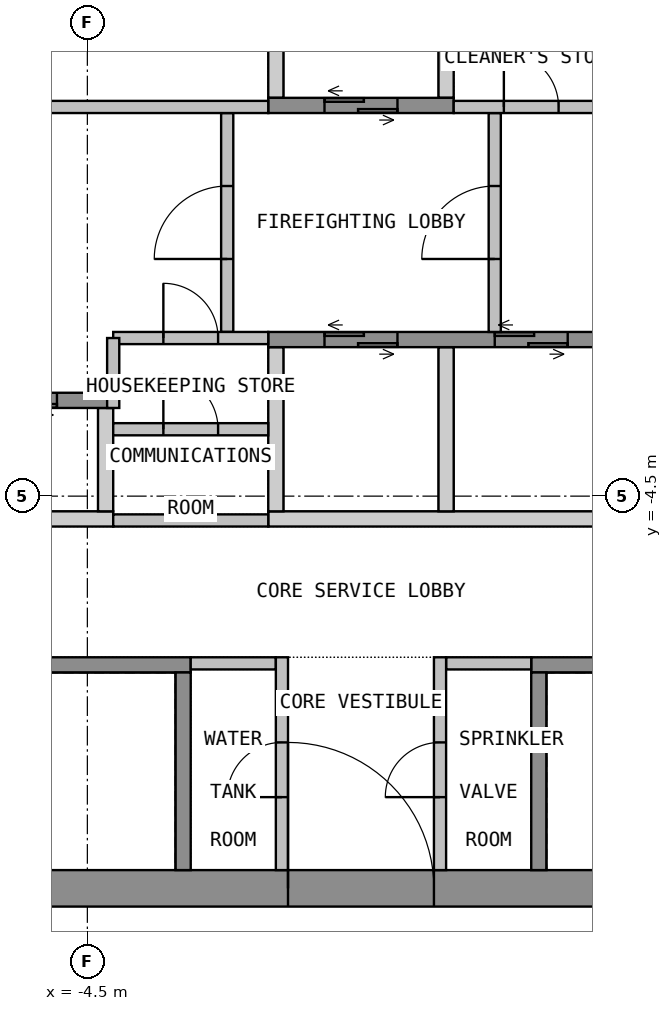
"""IFC4 building model, lengths in metres.
Left out: names, types, materials, properties, quantities, classifications, styles, units other than length and angle.
Written with IfcOpenShell. Run it as: python <this file> out.ifc"""

import sys

from ifc_helpers import new_model, si_unit, direction, frame, frame_2d, origin, place, context, subcontext, project, spatial, polyline, rectangle, outline, extrude, element, fill, save


model = new_model("IFC4")
c1 = context("Model", 3, precision=1e-05, world=origin(), true_north=direction((0.0, 1.0)))
c2 = subcontext(c1, "Body", "Model", "MODEL_VIEW")
j1 = project(units=[si_unit("LENGTHUNIT", "METRE"), si_unit("PLANEANGLEUNIT", "RADIAN")], contexts=[c1])
p1 = place(None, origin())
s1 = spatial("IfcSite", under=j1, at=p1, CompositionType="ELEMENT")
p2 = place(p1, origin())
s2 = spatial("IfcBuilding", under=s1, at=p2, CompositionType="ELEMENT")
p3 = place(p2, frame((0.0, 0.0, 179.4)))
s3 = spatial("IfcBuildingStorey", under=s2, at=p3, CompositionType="ELEMENT", Elevation=179.4)
p4 = place(p3, frame((-13.5, -10.95, 0.0), z_axis=(0.0, 0.0, 1.0), x_axis=(1.0, 0.0, 0.0)))
e1 = element("IfcWall", 1, at=p4, inside=s3, PredefinedType="SHEAR", context=c2, shape_type="SweptSolid", body=[
    extrude(rectangle(XDim=27.0, YDim=0.6, at=frame_2d((13.5, 0.0))), origin(), (0.0, 0.0, 1.0), 4.15),
])
p5 = place(p4, frame((12.3, 0.0, 0.0)))
e2 = element("IfcOpeningElement", 2, at=p5, cuts=e1, PredefinedType="OPENING", context=c2, shape_type="SweptSolid", body=[
    extrude(rectangle(XDim=2.4, YDim=2.1, at=frame_2d((1.2, 1.05))), frame((0.0, 0.31, 0.0), z_axis=(0.0, -1.0, 0.0), x_axis=(1.0, 0.0, 0.0)), (0.0, 0.0, 1.0), 0.62),
])
p6 = place(p4, frame((1.05, 0.0, 0.0)))
e3 = element("IfcOpeningElement", 3, at=p6, cuts=e1, PredefinedType="OPENING", context=c2, shape_type="SweptSolid", body=[
    extrude(rectangle(XDim=1.2, YDim=2.1, at=frame_2d((0.6, 1.05))), frame((0.0, 0.31, 0.0), z_axis=(0.0, -1.0, 0.0), x_axis=(1.0, 0.0, 0.0)), (0.0, 0.0, 1.0), 0.62),
])
p7 = place(p4, frame((24.75, 0.0, 0.0)))
e4 = element("IfcOpeningElement", 4, at=p7, cuts=e1, PredefinedType="OPENING", context=c2, shape_type="SweptSolid", body=[
    extrude(rectangle(XDim=1.2, YDim=2.1, at=frame_2d((0.6, 1.05))), frame((0.0, 0.31, 0.0), z_axis=(0.0, -1.0, 0.0), x_axis=(1.0, 0.0, 0.0)), (0.0, 0.0, 1.0), 0.62),
])
p8 = place(p3, origin())
e5 = element("IfcWall", 5, at=p8, inside=s3, PredefinedType="SHEAR", context=c2, shape_type="SweptSolid", body=[
    extrude(outline(polyline([(-1.525, 2.05), (-1.275, 2.05), (-1.275, 4.75), (-1.525, 4.75), (-1.525, 2.05)])), origin(), (0.0, 0.0, 1.0), 4.15),
])
p9 = place(p3, origin())
e6 = element("IfcWall", 6, at=p9, inside=s3, PredefinedType="SHEAR", context=c2, shape_type="SweptSolid", body=[
    extrude(outline(polyline([(1.275, 2.05), (1.525, 2.05), (1.525, 4.75), (1.275, 4.75), (1.275, 2.05)])), origin(), (0.0, 0.0, 1.0), 4.15),
])
p10 = place(p3, frame((-1.525, 1.925, 0.0), z_axis=(0.0, 0.0, 1.0), x_axis=(1.0, 0.0, 0.0)))
e7 = element("IfcWall", 7, at=p10, inside=s3, PredefinedType="SHEAR", context=c2, shape_type="SweptSolid", body=[
    extrude(rectangle(XDim=3.05, YDim=0.25, at=frame_2d((1.525, 0.0))), origin(), (0.0, 0.0, 1.0), 4.15),
])
p11 = place(p10, frame((0.925, 0.0, 0.0)))
e8 = element("IfcOpeningElement", 8, at=p11, cuts=e7, PredefinedType="OPENING", context=c2, shape_type="SweptSolid", body=[
    extrude(rectangle(XDim=1.2, YDim=2.1, at=frame_2d((0.6, 1.05))), frame((0.0, 0.135, 0.0), z_axis=(0.0, -1.0, 0.0), x_axis=(1.0, 0.0, 0.0)), (0.0, 0.0, 1.0), 0.27),
])
p12 = place(p3, origin())
e9 = element("IfcWall", 9, at=p12, inside=s3, PredefinedType="SHEAR", context=c2, shape_type="SweptSolid", body=[
    extrude(outline(polyline([(-12.9, -5.0), (-4.075, -5.0), (-4.075, -4.75), (-12.9, -4.75), (-12.9, -5.0)])), origin(), (0.0, 0.0, 1.0), 4.15),
])
p13 = place(p3, origin())
e10 = element("IfcWall", 10, at=p13, inside=s3, PredefinedType="SHEAR", context=c2, shape_type="SweptSolid", body=[
    extrude(outline(polyline([(-1.525, -5.0), (12.9, -5.0), (12.9, -4.75), (-1.525, -4.75), (-1.525, -5.0)])), origin(), (0.0, 0.0, 1.0), 4.15),
])
p14 = place(p3, origin())
e11 = element("IfcWall", 11, at=p14, inside=s3, PredefinedType="SHEAR", context=c2, shape_type="SweptSolid", body=[
    extrude(outline(polyline([(-4.325, -4.75), (-4.075, -4.75), (-4.075, -3.05), (-4.325, -3.05), (-4.325, -4.75)])), origin(), (0.0, 0.0, 1.0), 4.15),
])
p15 = place(p3, origin())
e12 = element("IfcWall", 12, at=p15, inside=s3, PredefinedType="SHEAR", context=c2, shape_type="SweptSolid", body=[
    extrude(outline(polyline([(-1.525, -4.75), (-1.275, -4.75), (-1.275, -2.05), (-1.525, -2.05), (-1.525, -4.75)])), origin(), (0.0, 0.0, 1.0), 4.15),
])
p16 = place(p3, origin())
e13 = element("IfcWall", 13, at=p16, inside=s3, PredefinedType="SHEAR", context=c2, shape_type="SweptSolid", body=[
    extrude(outline(polyline([(1.275, -4.75), (1.525, -4.75), (1.525, -2.05), (1.275, -2.05), (1.275, -4.75)])), origin(), (0.0, 0.0, 1.0), 4.15),
])
p17 = place(p3, frame((-12.9, -2.925, 0.0), z_axis=(0.0, 0.0, 1.0), x_axis=(1.0, 0.0, 0.0)))
e14 = element("IfcWall", 14, at=p17, inside=s3, PredefinedType="SHEAR", context=c2, shape_type="SweptSolid", body=[
    extrude(rectangle(XDim=8.825, YDim=0.25, at=frame_2d((4.413, 0.0))), origin(), (0.0, 0.0, 1.0), 4.15),
])
p18 = place(p17, frame((1.1, 0.0, 0.0)))
e15 = element("IfcOpeningElement", 15, at=p18, cuts=e14, PredefinedType="OPENING", context=c2, shape_type="SweptSolid", body=[
    extrude(rectangle(XDim=1.2, YDim=2.1, at=frame_2d((0.6, 1.05))), frame((0.0, 0.135, 0.0), z_axis=(0.0, -1.0, 0.0), x_axis=(1.0, 0.0, 0.0)), (0.0, 0.0, 1.0), 0.27),
])
p19 = place(p17, frame((3.9, 0.0, 0.0)))
e16 = element("IfcOpeningElement", 16, at=p19, cuts=e14, PredefinedType="OPENING", context=c2, shape_type="SweptSolid", body=[
    extrude(rectangle(XDim=1.2, YDim=2.1, at=frame_2d((0.6, 1.05))), frame((0.0, 0.135, 0.0), z_axis=(0.0, -1.0, 0.0), x_axis=(1.0, 0.0, 0.0)), (0.0, 0.0, 1.0), 0.27),
])
p20 = place(p17, frame((6.7, 0.0, 0.0)))
e17 = element("IfcOpeningElement", 17, at=p20, cuts=e14, PredefinedType="OPENING", context=c2, shape_type="SweptSolid", body=[
    extrude(rectangle(XDim=1.2, YDim=2.1, at=frame_2d((0.6, 1.05))), frame((0.0, 0.135, 0.0), z_axis=(0.0, -1.0, 0.0), x_axis=(1.0, 0.0, 0.0)), (0.0, 0.0, 1.0), 0.27),
])
p21 = place(p3, frame((-1.525, -1.925, 0.0), z_axis=(0.0, 0.0, 1.0), x_axis=(1.0, 0.0, 0.0)))
e18 = element("IfcWall", 18, at=p21, inside=s3, PredefinedType="SHEAR", context=c2, shape_type="SweptSolid", body=[
    extrude(rectangle(XDim=14.425, YDim=0.25, at=frame_2d((7.212, 0.0))), origin(), (0.0, 0.0, 1.0), 4.15),
])
p22 = place(p21, frame((0.925, 0.0, 0.0)))
e19 = element("IfcOpeningElement", 19, at=p22, cuts=e18, PredefinedType="OPENING", context=c2, shape_type="SweptSolid", body=[
    extrude(rectangle(XDim=1.2, YDim=2.1, at=frame_2d((0.6, 1.05))), frame((0.0, 0.135, 0.0), z_axis=(0.0, -1.0, 0.0), x_axis=(1.0, 0.0, 0.0)), (0.0, 0.0, 1.0), 0.27),
])
p23 = place(p21, frame((3.725, 0.0, 0.0)))
e20 = element("IfcOpeningElement", 20, at=p23, cuts=e18, PredefinedType="OPENING", context=c2, shape_type="SweptSolid", body=[
    extrude(rectangle(XDim=1.2, YDim=2.1, at=frame_2d((0.6, 1.05))), frame((0.0, 0.135, 0.0), z_axis=(0.0, -1.0, 0.0), x_axis=(1.0, 0.0, 0.0)), (0.0, 0.0, 1.0), 0.27),
])
p24 = place(p3, frame((-2.2, -1.8, 0.0), z_axis=(0.0, 0.0, 1.0), x_axis=(0.0, 1.0, 0.0)))
e21 = element("IfcWall", 21, at=p24, inside=s3, PredefinedType="PARTITIONING", context=c2, shape_type="SweptSolid", body=[
    extrude(rectangle(XDim=3.6, YDim=0.2, at=frame_2d((1.8, 0.0))), origin(), (0.0, 0.0, 1.0), 4.15),
])
p25 = place(p24, frame((1.2, 0.0, 0.0)))
e22 = element("IfcOpeningElement", 22, at=p25, cuts=e21, PredefinedType="OPENING", context=c2, shape_type="SweptSolid", body=[
    extrude(rectangle(XDim=1.2, YDim=2.1, at=frame_2d((0.6, 1.05))), frame((0.0, 0.11, 0.0), z_axis=(0.0, -1.0, 0.0), x_axis=(1.0, 0.0, 0.0)), (0.0, 0.0, 1.0), 0.22),
])
p26 = place(p3, frame((2.2, -1.8, 0.0), z_axis=(0.0, 0.0, 1.0), x_axis=(0.0, 1.0, 0.0)))
e23 = element("IfcWall", 23, at=p26, inside=s3, PredefinedType="PARTITIONING", context=c2, shape_type="SweptSolid", body=[
    extrude(rectangle(XDim=3.6, YDim=0.2, at=frame_2d((1.8, 0.0))), origin(), (0.0, 0.0, 1.0), 4.15),
])
p27 = place(p26, frame((1.2, 0.0, 0.0)))
e24 = element("IfcOpeningElement", 24, at=p27, cuts=e23, PredefinedType="OPENING", context=c2, shape_type="SweptSolid", body=[
    extrude(rectangle(XDim=1.2, YDim=2.1, at=frame_2d((0.6, 1.05))), frame((0.0, 0.11, 0.0), z_axis=(0.0, -1.0, 0.0), x_axis=(1.0, 0.0, 0.0)), (0.0, 0.0, 1.0), 0.22),
])
p28 = place(p3, frame((-12.9, -7.275, 0.0), z_axis=(0.0, 0.0, 1.0), x_axis=(1.0, 0.0, 0.0)))
e25 = element("IfcWall", 25, at=p28, inside=s3, PredefinedType="SHEAR", context=c2, shape_type="SweptSolid", body=[
    extrude(rectangle(XDim=10.1, YDim=0.25, at=frame_2d((5.05, 0.0))), origin(), (0.0, 0.0, 1.0), 4.15),
])
p29 = place(p28, frame((0.45, 0.0, 0.0)))
e26 = element("IfcOpeningElement", 26, at=p29, cuts=e25, PredefinedType="OPENING", context=c2, shape_type="SweptSolid", body=[
    extrude(rectangle(XDim=1.2, YDim=2.1, at=frame_2d((0.6, 1.05))), frame((0.0, 0.135, 0.0), z_axis=(0.0, -1.0, 0.0), x_axis=(1.0, 0.0, 0.0)), (0.0, 0.0, 1.0), 0.27),
])
p30 = place(p3, frame((-2.925, -10.65, 0.0), z_axis=(0.0, 0.0, 1.0), x_axis=(0.0, 1.0, 0.0)))
e27 = element("IfcWall", 27, at=p30, inside=s3, PredefinedType="SHEAR", context=c2, shape_type="SweptSolid", body=[
    extrude(rectangle(XDim=3.25, YDim=0.25, at=frame_2d((1.625, 0.0))), origin(), (0.0, 0.0, 1.0), 4.15),
])
p31 = place(p3, frame((2.8, -7.275, 0.0), z_axis=(0.0, 0.0, 1.0), x_axis=(1.0, 0.0, 0.0)))
e28 = element("IfcWall", 28, at=p31, inside=s3, PredefinedType="SHEAR", context=c2, shape_type="SweptSolid", body=[
    extrude(rectangle(XDim=10.1, YDim=0.25, at=frame_2d((5.05, 0.0))), origin(), (0.0, 0.0, 1.0), 4.15),
])
p32 = place(p31, frame((8.45, 0.0, 0.0)))
e29 = element("IfcOpeningElement", 29, at=p32, cuts=e28, PredefinedType="OPENING", context=c2, shape_type="SweptSolid", body=[
    extrude(rectangle(XDim=1.2, YDim=2.1, at=frame_2d((0.6, 1.05))), frame((0.0, 0.135, 0.0), z_axis=(0.0, -1.0, 0.0), x_axis=(1.0, 0.0, 0.0)), (0.0, 0.0, 1.0), 0.27),
])
p33 = place(p3, frame((2.925, -10.65, 0.0), z_axis=(0.0, 0.0, 1.0), x_axis=(0.0, 1.0, 0.0)))
e30 = element("IfcWall", 30, at=p33, inside=s3, PredefinedType="SHEAR", context=c2, shape_type="SweptSolid", body=[
    extrude(rectangle(XDim=3.25, YDim=0.25, at=frame_2d((1.625, 0.0))), origin(), (0.0, 0.0, 1.0), 4.15),
])
for number, where, z_axis, x_axis in (
    (31, (-2.8, -7.25, 0.0), (0.0, 0.0, 1.0), (1.0, 0.0, 0.0)),
    (32, (1.4, -7.25, 0.0), (0.0, 0.0, 1.0), (1.0, 0.0, 0.0)),
):
    element("IfcWall", number, at=place(p3, frame(where, z_axis=z_axis, x_axis=x_axis)), inside=s3, PredefinedType="PARTITIONING", context=c2, shape_type="SweptSolid", body=[
        extrude(rectangle(XDim=1.4, YDim=0.2, at=frame_2d((0.7, 0.0))), origin(), (0.0, 0.0, 1.0), 4.15),
    ])
p34 = place(p3, frame((-1.3, -10.65, 0.0), z_axis=(0.0, 0.0, 1.0), x_axis=(0.0, 1.0, 0.0)))
e33 = element("IfcWall", 33, at=p34, inside=s3, PredefinedType="PARTITIONING", context=c2, shape_type="SweptSolid", body=[
    extrude(rectangle(XDim=3.5, YDim=0.2, at=frame_2d((1.75, 0.0))), origin(), (0.0, 0.0, 1.0), 4.15),
])
p35 = place(p34, frame((1.2, 0.0, 0.0)))
e34 = element("IfcOpeningElement", 34, at=p35, cuts=e33, PredefinedType="OPENING", context=c2, shape_type="SweptSolid", body=[
    extrude(rectangle(XDim=0.9, YDim=2.1, at=frame_2d((0.45, 1.05))), frame((0.0, 0.11, 0.0), z_axis=(0.0, -1.0, 0.0), x_axis=(1.0, 0.0, 0.0)), (0.0, 0.0, 1.0), 0.22),
])
p36 = place(p3, frame((1.3, -10.65, 0.0), z_axis=(0.0, 0.0, 1.0), x_axis=(0.0, 1.0, 0.0)))
e35 = element("IfcWall", 35, at=p36, inside=s3, PredefinedType="PARTITIONING", context=c2, shape_type="SweptSolid", body=[
    extrude(rectangle(XDim=3.5, YDim=0.2, at=frame_2d((1.75, 0.0))), origin(), (0.0, 0.0, 1.0), 4.15),
])
p37 = place(p36, frame((1.2, 0.0, 0.0)))
e36 = element("IfcOpeningElement", 36, at=p37, cuts=e35, PredefinedType="OPENING", context=c2, shape_type="SweptSolid", body=[
    extrude(rectangle(XDim=0.9, YDim=2.1, at=frame_2d((0.45, 1.05))), frame((0.0, 0.11, 0.0), z_axis=(0.0, -1.0, 0.0), x_axis=(1.0, 0.0, 0.0)), (0.0, 0.0, 1.0), 0.22),
])
p38 = place(p3, frame((-12.9, 1.9, 0.0), z_axis=(0.0, 0.0, 1.0), x_axis=(1.0, 0.0, 0.0)))
e37 = element("IfcWall", 37, at=p38, inside=s3, PredefinedType="PARTITIONING", context=c2, shape_type="SweptSolid", body=[
    extrude(rectangle(XDim=11.375, YDim=0.2, at=frame_2d((5.688, 0.0))), origin(), (0.0, 0.0, 1.0), 4.15),
])
p39 = place(p38, frame((5.087, 0.0, 0.0)))
e38 = element("IfcOpeningElement", 38, at=p39, cuts=e37, PredefinedType="OPENING", context=c2, shape_type="SweptSolid", body=[
    extrude(rectangle(XDim=1.2, YDim=2.1, at=frame_2d((0.6, 1.05))), frame((0.0, 0.11, 0.0), z_axis=(0.0, -1.0, 0.0), x_axis=(1.0, 0.0, 0.0)), (0.0, 0.0, 1.0), 0.22),
])
p40 = place(p3, frame((1.525, 1.9, 0.0), z_axis=(0.0, 0.0, 1.0), x_axis=(1.0, 0.0, 0.0)))
e39 = element("IfcWall", 39, at=p40, inside=s3, PredefinedType="PARTITIONING", context=c2, shape_type="SweptSolid", body=[
    extrude(rectangle(XDim=2.55, YDim=0.2, at=frame_2d((1.275, 0.0))), origin(), (0.0, 0.0, 1.0), 4.15),
])
p41 = place(p40, frame((0.825, 0.0, 0.0)))
e40 = element("IfcOpeningElement", 40, at=p41, cuts=e39, PredefinedType="OPENING", context=c2, shape_type="SweptSolid", body=[
    extrude(rectangle(XDim=0.9, YDim=2.1, at=frame_2d((0.45, 1.05))), frame((0.0, 0.11, 0.0), z_axis=(0.0, -1.0, 0.0), x_axis=(1.0, 0.0, 0.0)), (0.0, 0.0, 1.0), 0.22),
])
p42 = place(p3, frame((-4.075, -3.4, 0.0), z_axis=(0.0, 0.0, 1.0), x_axis=(1.0, 0.0, 0.0)))
e41 = element("IfcWall", 41, at=p42, inside=s3, PredefinedType="PARTITIONING", context=c2, shape_type="SweptSolid", body=[
    extrude(rectangle(XDim=2.55, YDim=0.2, at=frame_2d((1.275, 0.0))), origin(), (0.0, 0.0, 1.0), 4.15),
])
p43 = place(p42, frame((0.825, 0.0, 0.0)))
e42 = element("IfcOpeningElement", 42, at=p43, cuts=e41, PredefinedType="OPENING", context=c2, shape_type="SweptSolid", body=[
    extrude(rectangle(XDim=0.9, YDim=2.1, at=frame_2d((0.45, 1.05))), frame((0.0, 0.11, 0.0), z_axis=(0.0, -1.0, 0.0), x_axis=(1.0, 0.0, 0.0)), (0.0, 0.0, 1.0), 0.22),
])
p44 = place(p3, frame((-4.075, -1.9, 0.0), z_axis=(0.0, 0.0, 1.0), x_axis=(1.0, 0.0, 0.0)))
e43 = element("IfcWall", 43, at=p44, inside=s3, PredefinedType="PARTITIONING", context=c2, shape_type="SweptSolid", body=[
    extrude(rectangle(XDim=2.55, YDim=0.2, at=frame_2d((1.275, 0.0))), origin(), (0.0, 0.0, 1.0), 4.15),
])
p45 = place(p44, frame((0.825, 0.0, 0.0)))
e44 = element("IfcOpeningElement", 44, at=p45, cuts=e43, PredefinedType="OPENING", context=c2, shape_type="SweptSolid", body=[
    extrude(rectangle(XDim=0.9, YDim=2.1, at=frame_2d((0.45, 1.05))), frame((0.0, 0.11, 0.0), z_axis=(0.0, -1.0, 0.0), x_axis=(1.0, 0.0, 0.0)), (0.0, 0.0, 1.0), 0.22),
])
p46 = place(p3, frame((-4.075, -4.9, 0.0), z_axis=(0.0, 0.0, 1.0), x_axis=(1.0, 0.0, 0.0)))
e45 = element("IfcWall", 45, at=p46, inside=s3, PredefinedType="PARTITIONING", context=c2, shape_type="SweptSolid", body=[
    extrude(rectangle(XDim=2.55, YDim=0.2, at=frame_2d((1.275, 0.0))), origin(), (0.0, 0.0, 1.0), 4.15),
])
p47 = place(p3, frame((-4.075, -1.9, 0.0), z_axis=(0.0, 0.0, 1.0), x_axis=(0.0, -1.0, 0.0)))
e46 = element("IfcWall", 46, at=p47, inside=s3, PredefinedType="PARTITIONING", context=c2, shape_type="SweptSolid", body=[
    extrude(rectangle(XDim=1.15, YDim=0.2, at=frame_2d((0.575, 0.0))), origin(), (0.0, 0.0, 1.0), 4.15),
])
p48 = place(p5, origin())
e47 = element("IfcDoor", 47, at=p48, inside=s3, OperationType="DOUBLE_DOOR_DOUBLE_SWING", PredefinedType="DOOR", context=c2, shape_type="SweptSolid", body=[
    extrude(rectangle(XDim=2.4, YDim=2.1, at=frame_2d((1.2, 1.05))), frame((0.0, 0.025, 0.0), z_axis=(0.0, -1.0, 0.0), x_axis=(1.0, 0.0, 0.0)), (0.0, 0.0, 1.0), 0.05),
])
fill(e2, e47)
p49 = place(p11, origin())
e48 = element("IfcDoor", 48, at=p49, inside=s3, OperationType="DOUBLE_DOOR_SLIDING", PredefinedType="DOOR", context=c2, shape_type="SweptSolid", body=[
    extrude(rectangle(XDim=1.2, YDim=2.1, at=frame_2d((0.6, 1.05))), frame((0.0, 0.025, 0.0), z_axis=(0.0, -1.0, 0.0), x_axis=(1.0, 0.0, 0.0)), (0.0, 0.0, 1.0), 0.05),
])
fill(e8, e48)
p50 = place(p20, origin())
e49 = element("IfcDoor", 49, at=p50, inside=s3, OperationType="DOUBLE_DOOR_SLIDING", PredefinedType="DOOR", context=c2, shape_type="SweptSolid", body=[
    extrude(rectangle(XDim=1.2, YDim=2.1, at=frame_2d((0.6, 1.05))), frame((0.0, 0.025, 0.0), z_axis=(0.0, -1.0, 0.0), x_axis=(1.0, 0.0, 0.0)), (0.0, 0.0, 1.0), 0.05),
])
fill(e17, e49)
p51 = place(p22, origin())
e50 = element("IfcDoor", 50, at=p51, inside=s3, OperationType="DOUBLE_DOOR_SLIDING", PredefinedType="DOOR", context=c2, shape_type="SweptSolid", body=[
    extrude(rectangle(XDim=1.2, YDim=2.1, at=frame_2d((0.6, 1.05))), frame((0.0, 0.025, 0.0), z_axis=(0.0, -1.0, 0.0), x_axis=(1.0, 0.0, 0.0)), (0.0, 0.0, 1.0), 0.05),
])
fill(e19, e50)
p52 = place(p23, origin())
e51 = element("IfcDoor", 51, at=p52, inside=s3, OperationType="DOUBLE_DOOR_SLIDING", PredefinedType="DOOR", context=c2, shape_type="SweptSolid", body=[
    extrude(rectangle(XDim=1.2, YDim=2.1, at=frame_2d((0.6, 1.05))), frame((0.0, 0.025, 0.0), z_axis=(0.0, -1.0, 0.0), x_axis=(1.0, 0.0, 0.0)), (0.0, 0.0, 1.0), 0.05),
])
fill(e20, e51)
p53 = place(p25, origin())
e52 = element("IfcDoor", 52, at=p53, inside=s3, OperationType="SINGLE_SWING_LEFT", PredefinedType="DOOR", context=c2, shape_type="SweptSolid", body=[
    extrude(rectangle(XDim=1.2, YDim=2.1, at=frame_2d((0.6, 1.05))), frame((0.0, 0.025, 0.0), z_axis=(0.0, -1.0, 0.0), x_axis=(1.0, 0.0, 0.0)), (0.0, 0.0, 1.0), 0.05),
])
fill(e22, e52)
p54 = place(p27, origin())
e53 = element("IfcDoor", 53, at=p54, inside=s3, OperationType="SINGLE_SWING_LEFT", PredefinedType="DOOR", context=c2, shape_type="SweptSolid", body=[
    extrude(rectangle(XDim=1.2, YDim=2.1, at=frame_2d((0.6, 1.05))), frame((0.0, 0.025, 0.0), z_axis=(0.0, -1.0, 0.0), x_axis=(1.0, 0.0, 0.0)), (0.0, 0.0, 1.0), 0.05),
])
fill(e24, e53)
p55 = place(p35, origin())
e54 = element("IfcDoor", 54, at=p55, inside=s3, OperationType="SINGLE_SWING_LEFT", PredefinedType="DOOR", context=c2, shape_type="SweptSolid", body=[
    extrude(rectangle(XDim=0.9, YDim=2.1, at=frame_2d((0.45, 1.05))), frame((0.0, 0.025, 0.0), z_axis=(0.0, -1.0, 0.0), x_axis=(1.0, 0.0, 0.0)), (0.0, 0.0, 1.0), 0.05),
])
fill(e34, e54)
p56 = place(p37, origin())
e55 = element("IfcDoor", 55, at=p56, inside=s3, OperationType="SINGLE_SWING_LEFT", PredefinedType="DOOR", context=c2, shape_type="SweptSolid", body=[
    extrude(rectangle(XDim=0.9, YDim=2.1, at=frame_2d((0.45, 1.05))), frame((0.0, 0.025, 0.0), z_axis=(0.0, -1.0, 0.0), x_axis=(1.0, 0.0, 0.0)), (0.0, 0.0, 1.0), 0.05),
])
fill(e36, e55)
p57 = place(p41, origin())
e56 = element("IfcDoor", 56, at=p57, inside=s3, OperationType="SINGLE_SWING_LEFT", PredefinedType="DOOR", context=c2, shape_type="SweptSolid", body=[
    extrude(rectangle(XDim=0.9, YDim=2.1, at=frame_2d((0.45, 1.05))), frame((0.0, 0.025, 0.0), z_axis=(0.0, -1.0, 0.0), x_axis=(1.0, 0.0, 0.0)), (0.0, 0.0, 1.0), 0.05),
])
fill(e40, e56)
p58 = place(p43, origin())
e57 = element("IfcDoor", 57, at=p58, inside=s3, OperationType="SINGLE_SWING_LEFT", PredefinedType="DOOR", context=c2, shape_type="SweptSolid", body=[
    extrude(rectangle(XDim=0.9, YDim=2.1, at=frame_2d((0.45, 1.05))), frame((0.0, 0.025, 0.0), z_axis=(0.0, -1.0, 0.0), x_axis=(1.0, 0.0, 0.0)), (0.0, 0.0, 1.0), 0.05),
])
fill(e42, e57)
p59 = place(p45, origin())
e58 = element("IfcDoor", 58, at=p59, inside=s3, OperationType="SINGLE_SWING_LEFT", PredefinedType="DOOR", context=c2, shape_type="SweptSolid", body=[
    extrude(rectangle(XDim=0.9, YDim=2.1, at=frame_2d((0.45, 1.05))), frame((0.0, 0.025, 0.0), z_axis=(0.0, -1.0, 0.0), x_axis=(1.0, 0.0, 0.0)), (0.0, 0.0, 1.0), 0.05),
])
fill(e44, e58)
save(model, sys.argv[1])
